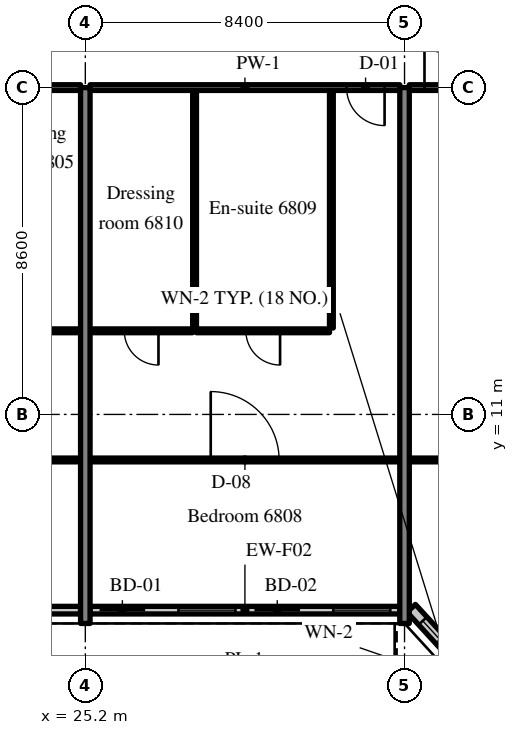
"""IFC4 building model, lengths in metres.
Left out: names, types, materials, properties, quantities, classifications, styles, units other than length and angle.
Written with IfcOpenShell. Run it as: python <this file> out.ifc"""

import sys

from ifc_helpers import new_model, si_unit, direction, frame, frame_2d, origin, place, context, subcontext, project, spatial, rectangle, extrude, source, transform, mapped, element, fill, save


model = new_model("IFC4")
c1 = context("Model", 3, precision=1e-05, world=origin(), true_north=direction((0.0, 1.0)))
c2 = subcontext(c1, "Body", "Model", "MODEL_VIEW")
j1 = project(units=[si_unit("LENGTHUNIT", "METRE"), si_unit("PLANEANGLEUNIT", "RADIAN")], contexts=[c1])
p1 = place(None, origin())
s1 = spatial("IfcSite", under=j1, at=p1, CompositionType="ELEMENT")
p2 = place(p1, origin())
s2 = spatial("IfcBuilding", under=s1, at=p2, CompositionType="ELEMENT")
p3 = place(p2, frame((0.0, 0.0, 285.7)))
s3 = spatial("IfcBuildingStorey", under=s2, at=p3, CompositionType="ELEMENT", Elevation=285.7)
m1 = source(origin(), c2, "Body", "SweptSolid", [
    extrude(rectangle(XDim=14.1, YDim=0.25, at=frame_2d((7.05, 0.0))), origin(), (0.0, 0.0, 1.0), 3.72),
])
for number, where, z_axis, x_axis in (
    (1, (25.2, 5.5, 0.0), (0.0, 0.0, 1.0), (0.0, 1.0, 0.0)),
    (2, (33.6, 5.5, 0.0), (0.0, 0.0, 1.0), (0.0, 1.0, 0.0)),
):
    element("IfcWall", number, at=place(p3, frame(where, z_axis=z_axis, x_axis=x_axis)), inside=s3, PredefinedType="SHEAR", context=c2, shape_type="MappedRepresentation", body=[
        mapped(m1, transform((0.0, 0.0, 0.0), scale=1.0)),
    ])
m2 = source(origin(), c2, "Body", "SweptSolid", [
    extrude(rectangle(XDim=6.53, YDim=0.2, at=frame_2d((3.265, 0.0))), origin(), (0.0, 0.0, 1.0), 3.17),
])
p4 = place(p3, frame((18.545, 5.85, 0.0), z_axis=(0.0, 0.0, 1.0), x_axis=(1.0, 0.0, 0.0)))
e3 = element("IfcWall", 3, at=p4, inside=s3, PredefinedType="SOLIDWALL", context=c2, shape_type="MappedRepresentation", body=[
    mapped(m2, transform((0.0, 0.0, 0.0), scale=1.0)),
])
m3 = source(origin(), c2, "Body", "SweptSolid", [
    extrude(rectangle(XDim=1.5, YDim=1.5, at=frame_2d((0.75, 0.75))), frame((0.0, 0.11, 0.0), z_axis=(0.0, -1.0, 0.0), x_axis=(1.0, 0.0, 0.0)), (0.0, 0.0, 1.0), 0.22),
])
p5 = place(p4, frame((0.883, 0.0, 0.9)))
e4 = element("IfcOpeningElement", 4, at=p5, cuts=e3, PredefinedType="OPENING", context=c2, shape_type="MappedRepresentation", body=[
    mapped(m3, transform((0.0, 0.0, 0.0), scale=1.0)),
])
p6 = place(p4, frame((4.147, 0.0, 0.9)))
e5 = element("IfcOpeningElement", 5, at=p6, cuts=e3, PredefinedType="OPENING", context=c2, shape_type="MappedRepresentation", body=[
    mapped(m3, transform((0.0, 0.0, 0.0), scale=1.0)),
])
m4 = source(origin(), c2, "Body", "SweptSolid", [
    extrude(rectangle(XDim=8.15, YDim=0.2, at=frame_2d((4.075, 0.0))), origin(), (0.0, 0.0, 1.0), 3.17),
])
p7 = place(p3, frame((25.325, 5.85, 0.0), z_axis=(0.0, 0.0, 1.0), x_axis=(1.0, 0.0, 0.0)))
e6 = element("IfcWall", 6, at=p7, inside=s3, PredefinedType="SOLIDWALL", context=c2, shape_type="MappedRepresentation", body=[
    mapped(m4, transform((0.0, 0.0, 0.0), scale=1.0)),
])
m5 = source(origin(), c2, "Body", "SweptSolid", [
    extrude(rectangle(XDim=1.2, YDim=2.4, at=frame_2d((0.6, 1.2))), frame((0.0, 0.11, 0.0), z_axis=(0.0, -1.0, 0.0), x_axis=(1.0, 0.0, 0.0)), (0.0, 0.0, 1.0), 0.22),
])
p8 = place(p7, frame((0.25, 0.0, 0.0)))
e7 = element("IfcOpeningElement", 7, at=p8, cuts=e6, PredefinedType="OPENING", context=c2, shape_type="MappedRepresentation", body=[
    mapped(m5, transform((0.0, 0.0, 0.0), scale=1.0)),
])
p9 = place(p7, frame((2.325, 0.0, 0.9)))
e8 = element("IfcOpeningElement", 8, at=p9, cuts=e6, PredefinedType="OPENING", context=c2, shape_type="MappedRepresentation", body=[
    mapped(m3, transform((0.0, 0.0, 0.0), scale=1.0)),
])
p10 = place(p7, frame((4.325, 0.0, 0.0)))
e9 = element("IfcOpeningElement", 9, at=p10, cuts=e6, PredefinedType="OPENING", context=c2, shape_type="MappedRepresentation", body=[
    mapped(m5, transform((0.0, 0.0, 0.0), scale=1.0)),
])
p11 = place(p7, frame((6.4, 0.0, 0.9)))
e10 = element("IfcOpeningElement", 10, at=p11, cuts=e6, PredefinedType="OPENING", context=c2, shape_type="MappedRepresentation", body=[
    mapped(m3, transform((0.0, 0.0, 0.0), scale=1.0)),
])
m6 = source(origin(), c2, "Body", "SweptSolid", [
    extrude(rectangle(XDim=2.398, YDim=0.3, at=frame_2d((1.199, 0.0))), origin(), (0.0, 0.0, 1.0), 3.72),
])
p12 = place(p3, frame((33.776, 5.9, 0.0), z_axis=(0.0, 0.0, 1.0), x_axis=(0.675374189419, -0.737475222815, 0.0)))
e11 = element("IfcWall", 11, at=p12, inside=s3, PredefinedType="SOLIDWALL", context=c2, shape_type="MappedRepresentation", body=[
    mapped(m6, transform((0.0, 0.0, 0.0), scale=1.0)),
])
m7 = source(origin(), c2, "Body", "SweptSolid", [
    extrude(rectangle(XDim=1.5, YDim=2.0, at=frame_2d((0.75, 1.0))), frame((0.0, 0.16, 0.0), z_axis=(0.0, -1.0, 0.0), x_axis=(1.0, 0.0, 0.0)), (0.0, 0.0, 1.0), 0.32),
])
p13 = place(p12, frame((0.449, 0.0, 0.9)))
e12 = element("IfcOpeningElement", 12, at=p13, cuts=e11, PredefinedType="OPENING", context=c2, shape_type="MappedRepresentation", body=[
    mapped(m7, transform((0.0, 0.0, 0.0), scale=1.0)),
])
m8 = source(origin(), c2, "Body", "SweptSolid", [
    extrude(rectangle(XDim=2.575, YDim=0.1, at=frame_2d((1.288, 0.0))), origin(), (0.0, 0.0, 1.0), 3.72),
])
p14 = place(p3, frame((22.5, 13.2, 0.0), z_axis=(0.0, 0.0, 1.0), x_axis=(1.0, 0.0, 0.0)))
e13 = element("IfcWall", 13, at=p14, inside=s3, PredefinedType="PARTITIONING", context=c2, shape_type="MappedRepresentation", body=[
    mapped(m8, transform((0.0, 0.0, 0.0), scale=1.0)),
])
m9 = source(origin(), c2, "Body", "SweptSolid", [
    extrude(rectangle(XDim=0.9, YDim=2.1, at=frame_2d((0.45, 1.05))), frame((0.0, 0.06, 0.0), z_axis=(0.0, -1.0, 0.0), x_axis=(1.0, 0.0, 0.0)), (0.0, 0.0, 1.0), 0.12),
])
p15 = place(p14, frame((0.838, 0.0, 0.0)))
e14 = element("IfcOpeningElement", 14, at=p15, cuts=e13, PredefinedType="OPENING", context=c2, shape_type="MappedRepresentation", body=[
    mapped(m9, transform((0.0, 0.0, 0.0), scale=1.0)),
])
m10 = source(origin(), c2, "Body", "SweptSolid", [
    extrude(rectangle(XDim=8.025, YDim=0.1, at=frame_2d((4.012, 0.0))), origin(), (0.0, 0.0, 1.0), 3.72),
])
p16 = place(p3, frame((17.05, 9.802, 0.0), z_axis=(0.0, 0.0, 1.0), x_axis=(1.0, 0.0, 0.0)))
e15 = element("IfcWall", 15, at=p16, inside=s3, PredefinedType="PARTITIONING", context=c2, shape_type="MappedRepresentation", body=[
    mapped(m10, transform((0.0, 0.0, 0.0), scale=1.0)),
])
m11 = source(origin(), c2, "Body", "SweptSolid", [
    extrude(rectangle(XDim=1.8, YDim=2.1, at=frame_2d((0.9, 1.05))), frame((0.0, 0.06, 0.0), z_axis=(0.0, -1.0, 0.0), x_axis=(1.0, 0.0, 0.0)), (0.0, 0.0, 1.0), 0.12),
])
p17 = place(p16, frame((3.113, 0.0, 0.0)))
e16 = element("IfcOpeningElement", 16, at=p17, cuts=e15, PredefinedType="OPENING", context=c2, shape_type="MappedRepresentation", body=[
    mapped(m11, transform((0.0, 0.0, 0.0), scale=1.0)),
])
m12 = source(origin(), c2, "Body", "SweptSolid", [
    extrude(rectangle(XDim=8.025, YDim=0.15, at=frame_2d((4.012, 0.0))), origin(), (0.0, 0.0, 1.0), 3.02),
])
p18 = place(p3, frame((17.05, 19.6, 0.0), z_axis=(0.0, 0.0, 1.0), x_axis=(1.0, 0.0, 0.0)))
e17 = element("IfcWall", 17, at=p18, inside=s3, PredefinedType="PARTITIONING", context=c2, shape_type="MappedRepresentation", body=[
    mapped(m12, transform((0.0, 0.0, 0.0), scale=1.0)),
])
m13 = source(origin(), c2, "Body", "SweptSolid", [
    extrude(rectangle(XDim=1.0, YDim=2.1, at=frame_2d((0.5, 1.05))), frame((0.0, 0.085, 0.0), z_axis=(0.0, -1.0, 0.0), x_axis=(1.0, 0.0, 0.0)), (0.0, 0.0, 1.0), 0.17),
])
p19 = place(p18, frame((0.4, 0.0, 0.0)))
e18 = element("IfcOpeningElement", 18, at=p19, cuts=e17, PredefinedType="OPENING", context=c2, shape_type="MappedRepresentation", body=[
    mapped(m13, transform((0.0, 0.0, 0.0), scale=1.0)),
])
m14 = source(origin(), c2, "Body", "SweptSolid", [
    extrude(rectangle(XDim=6.25, YDim=0.1, at=frame_2d((3.125, 0.0))), origin(), (0.0, 0.0, 1.0), 3.72),
])
for number, where, z_axis, x_axis in (
    (19, (31.675, 13.275, 0.0), (0.0, 0.0, 1.0), (0.0, 1.0, 0.0)),
    (20, (28.075, 13.275, 0.0), (0.0, 0.0, 1.0), (0.0, 1.0, 0.0)),
):
    element("IfcWall", number, at=place(p3, frame(where, z_axis=z_axis, x_axis=x_axis)), inside=s3, PredefinedType="PARTITIONING", context=c2, shape_type="MappedRepresentation", body=[
        mapped(m14, transform((0.0, 0.0, 0.0), scale=1.0)),
    ])
m15 = source(origin(), c2, "Body", "SweptSolid", [
    extrude(rectangle(XDim=3.5, YDim=0.1, at=frame_2d((1.75, 0.0))), origin(), (0.0, 0.0, 1.0), 3.72),
])
p20 = place(p3, frame((28.125, 13.2, 0.0), z_axis=(0.0, 0.0, 1.0), x_axis=(1.0, 0.0, 0.0)))
e21 = element("IfcWall", 21, at=p20, inside=s3, PredefinedType="PARTITIONING", context=c2, shape_type="MappedRepresentation", body=[
    mapped(m15, transform((0.0, 0.0, 0.0), scale=1.0)),
])
p21 = place(p20, frame((1.3, 0.0, 0.0)))
e22 = element("IfcOpeningElement", 22, at=p21, cuts=e21, PredefinedType="OPENING", context=c2, shape_type="MappedRepresentation", body=[
    mapped(m9, transform((0.0, 0.0, 0.0), scale=1.0)),
])
m16 = source(origin(), c2, "Body", "SweptSolid", [
    extrude(rectangle(XDim=2.7, YDim=0.1, at=frame_2d((1.35, 0.0))), origin(), (0.0, 0.0, 1.0), 3.72),
])
p22 = place(p3, frame((25.325, 13.2, 0.0), z_axis=(0.0, 0.0, 1.0), x_axis=(1.0, 0.0, 0.0)))
e23 = element("IfcWall", 23, at=p22, inside=s3, PredefinedType="PARTITIONING", context=c2, shape_type="MappedRepresentation", body=[
    mapped(m16, transform((0.0, 0.0, 0.0), scale=1.0)),
])
p23 = place(p22, frame((0.9, 0.0, 0.0)))
e24 = element("IfcOpeningElement", 24, at=p23, cuts=e23, PredefinedType="OPENING", context=c2, shape_type="MappedRepresentation", body=[
    mapped(m9, transform((0.0, 0.0, 0.0), scale=1.0)),
])
m17 = source(origin(), c2, "Body", "SweptSolid", [
    extrude(rectangle(XDim=8.15, YDim=0.1, at=frame_2d((4.075, 0.0))), origin(), (0.0, 0.0, 1.0), 3.72),
])
p24 = place(p3, frame((25.325, 9.802, 0.0), z_axis=(0.0, 0.0, 1.0), x_axis=(1.0, 0.0, 0.0)))
e25 = element("IfcWall", 25, at=p24, inside=s3, PredefinedType="PARTITIONING", context=c2, shape_type="MappedRepresentation", body=[
    mapped(m17, transform((0.0, 0.0, 0.0), scale=1.0)),
])
p25 = place(p24, frame((3.175, 0.0, 0.0)))
e26 = element("IfcOpeningElement", 26, at=p25, cuts=e25, PredefinedType="OPENING", context=c2, shape_type="MappedRepresentation", body=[
    mapped(m11, transform((0.0, 0.0, 0.0), scale=1.0)),
])
m18 = source(origin(), c2, "Body", "SweptSolid", [
    extrude(rectangle(XDim=8.15, YDim=0.15, at=frame_2d((4.075, 0.0))), origin(), (0.0, 0.0, 1.0), 3.02),
])
p26 = place(p3, frame((25.325, 19.6, 0.0), z_axis=(0.0, 0.0, 1.0), x_axis=(1.0, 0.0, 0.0)))
e27 = element("IfcWall", 27, at=p26, inside=s3, PredefinedType="PARTITIONING", context=c2, shape_type="MappedRepresentation", body=[
    mapped(m18, transform((0.0, 0.0, 0.0), scale=1.0)),
])
p27 = place(p26, frame((6.75, 0.0, 0.0)))
e28 = element("IfcOpeningElement", 28, at=p27, cuts=e27, PredefinedType="OPENING", context=c2, shape_type="MappedRepresentation", body=[
    mapped(m13, transform((0.0, 0.0, 0.0), scale=1.0)),
])
m19 = source(origin(), c2, "Body", "SweptSolid", [
    extrude(rectangle(XDim=8.15, YDim=0.1, at=frame_2d((4.075, 0.0))), origin(), (0.0, 0.0, 1.0), 3.72),
])
p28 = place(p3, frame((33.725, 9.802, 0.0), z_axis=(0.0, 0.0, 1.0), x_axis=(1.0, 0.0, 0.0)))
e29 = element("IfcWall", 29, at=p28, inside=s3, PredefinedType="PARTITIONING", context=c2, shape_type="MappedRepresentation", body=[
    mapped(m19, transform((0.0, 0.0, 0.0), scale=1.0)),
])
p29 = place(p28, frame((3.175, 0.0, 0.0)))
e30 = element("IfcOpeningElement", 30, at=p29, cuts=e29, PredefinedType="OPENING", context=c2, shape_type="MappedRepresentation", body=[
    mapped(m11, transform((0.0, 0.0, 0.0), scale=1.0)),
])
m20 = source(origin(), c2, "Body", "SweptSolid", [
    extrude(rectangle(XDim=8.15, YDim=0.15, at=frame_2d((4.075, 0.0))), origin(), (0.0, 0.0, 1.0), 3.02),
])
p30 = place(p3, frame((33.725, 19.6, 0.0), z_axis=(0.0, 0.0, 1.0), x_axis=(1.0, 0.0, 0.0)))
e31 = element("IfcWall", 31, at=p30, inside=s3, PredefinedType="PARTITIONING", context=c2, shape_type="MappedRepresentation", body=[
    mapped(m20, transform((0.0, 0.0, 0.0), scale=1.0)),
])
p31 = place(p30, frame((0.4, 0.0, 0.0)))
e32 = element("IfcOpeningElement", 32, at=p31, cuts=e31, PredefinedType="OPENING", context=c2, shape_type="MappedRepresentation", body=[
    mapped(m13, transform((0.0, 0.0, 0.0), scale=1.0)),
])
m21 = source(origin(), c2, "Body", "SweptSolid", [
    extrude(rectangle(XDim=1.2, YDim=2.4, at=frame_2d((0.6, 1.2))), frame((0.0, 0.025, 0.0), z_axis=(0.0, -1.0, 0.0), x_axis=(1.0, 0.0, 0.0)), (0.0, 0.0, 1.0), 0.05),
])
p32 = place(p8, origin())
e33 = element("IfcDoor", 33, at=p32, inside=s3, OperationType="SLIDING_TO_LEFT", PredefinedType="DOOR", context=c2, shape_type="MappedRepresentation", body=[
    mapped(m21, transform((0.0, 0.0, 0.0), scale=1.0)),
])
fill(e7, e33)
m22 = source(origin(), c2, "Body", "SweptSolid", [
    extrude(rectangle(XDim=1.5, YDim=1.5, at=frame_2d((0.75, 0.75))), frame((0.0, 0.03, 0.0), z_axis=(0.0, -1.0, 0.0), x_axis=(1.0, 0.0, 0.0)), (0.0, 0.0, 1.0), 0.06),
])
p33 = place(p9, origin())
e34 = element("IfcWindow", 34, at=p33, inside=s3, PartitioningType="SINGLE_PANEL", PredefinedType="WINDOW", context=c2, shape_type="MappedRepresentation", body=[
    mapped(m22, transform((0.0, 0.0, 0.0), scale=1.0)),
])
fill(e8, e34)
p34 = place(p10, origin())
e35 = element("IfcDoor", 35, at=p34, inside=s3, OperationType="SLIDING_TO_RIGHT", PredefinedType="DOOR", context=c2, shape_type="MappedRepresentation", body=[
    mapped(m21, transform((0.0, 0.0, 0.0), scale=1.0)),
])
fill(e9, e35)
p35 = place(p11, origin())
e36 = element("IfcWindow", 36, at=p35, inside=s3, PartitioningType="SINGLE_PANEL", PredefinedType="WINDOW", context=c2, shape_type="MappedRepresentation", body=[
    mapped(m22, transform((0.0, 0.0, 0.0), scale=1.0)),
])
fill(e10, e36)
m23 = source(origin(), c2, "Body", "SweptSolid", [
    extrude(rectangle(XDim=1.5, YDim=2.0, at=frame_2d((0.75, 1.0))), frame((0.0, 0.03, 0.0), z_axis=(0.0, -1.0, 0.0), x_axis=(1.0, 0.0, 0.0)), (0.0, 0.0, 1.0), 0.06),
])
p36 = place(p13, origin())
e37 = element("IfcWindow", 37, at=p36, inside=s3, PartitioningType="SINGLE_PANEL", PredefinedType="WINDOW", context=c2, shape_type="MappedRepresentation", body=[
    mapped(m23, transform((0.0, 0.0, 0.0), scale=1.0)),
])
fill(e12, e37)
m24 = source(origin(), c2, "Body", "SweptSolid", [
    extrude(rectangle(XDim=0.9, YDim=2.1, at=frame_2d((0.45, 1.05))), frame((0.0, 0.025, 0.0), z_axis=(0.0, -1.0, 0.0), x_axis=(1.0, 0.0, 0.0)), (0.0, 0.0, 1.0), 0.05),
])
p37 = place(p21, origin())
e38 = element("IfcDoor", 38, at=p37, inside=s3, OperationType="SINGLE_SWING_RIGHT", PredefinedType="DOOR", context=c2, shape_type="MappedRepresentation", body=[
    mapped(m24, transform((0.0, 0.0, 0.0), scale=1.0)),
])
fill(e22, e38)
p38 = place(p23, origin())
e39 = element("IfcDoor", 39, at=p38, inside=s3, OperationType="SINGLE_SWING_RIGHT", PredefinedType="DOOR", context=c2, shape_type="MappedRepresentation", body=[
    mapped(m24, transform((0.0, 0.0, 0.0), scale=1.0)),
])
fill(e24, e39)
m25 = source(origin(), c2, "Body", "SweptSolid", [
    extrude(rectangle(XDim=1.8, YDim=2.1, at=frame_2d((0.9, 1.05))), frame((0.0, 0.025, 0.0), z_axis=(0.0, -1.0, 0.0), x_axis=(1.0, 0.0, 0.0)), (0.0, 0.0, 1.0), 0.05),
])
p39 = place(p25, origin())
e40 = element("IfcDoor", 40, at=p39, inside=s3, OperationType="DOUBLE_DOOR_SINGLE_SWING", PredefinedType="DOOR", context=c2, shape_type="MappedRepresentation", body=[
    mapped(m25, transform((0.0, 0.0, 0.0), scale=1.0)),
])
fill(e26, e40)
m26 = source(origin(), c2, "Body", "SweptSolid", [
    extrude(rectangle(XDim=1.0, YDim=2.1, at=frame_2d((0.5, 1.05))), frame((0.0, 0.025, 0.0), z_axis=(0.0, -1.0, 0.0), x_axis=(1.0, 0.0, 0.0)), (0.0, 0.0, 1.0), 0.05),
])
p40 = place(p27, origin())
e41 = element("IfcDoor", 41, at=p40, inside=s3, OperationType="SINGLE_SWING_RIGHT", PredefinedType="DOOR", context=c2, shape_type="MappedRepresentation", body=[
    mapped(m26, transform((0.0, 0.0, 0.0), scale=1.0)),
])
fill(e28, e41)
p41 = place(p31, origin())
e42 = element("IfcDoor", 42, at=p41, inside=s3, OperationType="SINGLE_SWING_LEFT", PredefinedType="DOOR", context=c2, shape_type="MappedRepresentation", body=[
    mapped(m26, transform((0.0, 0.0, 0.0), scale=1.0)),
])
fill(e32, e42)
save(model, sys.argv[1])
